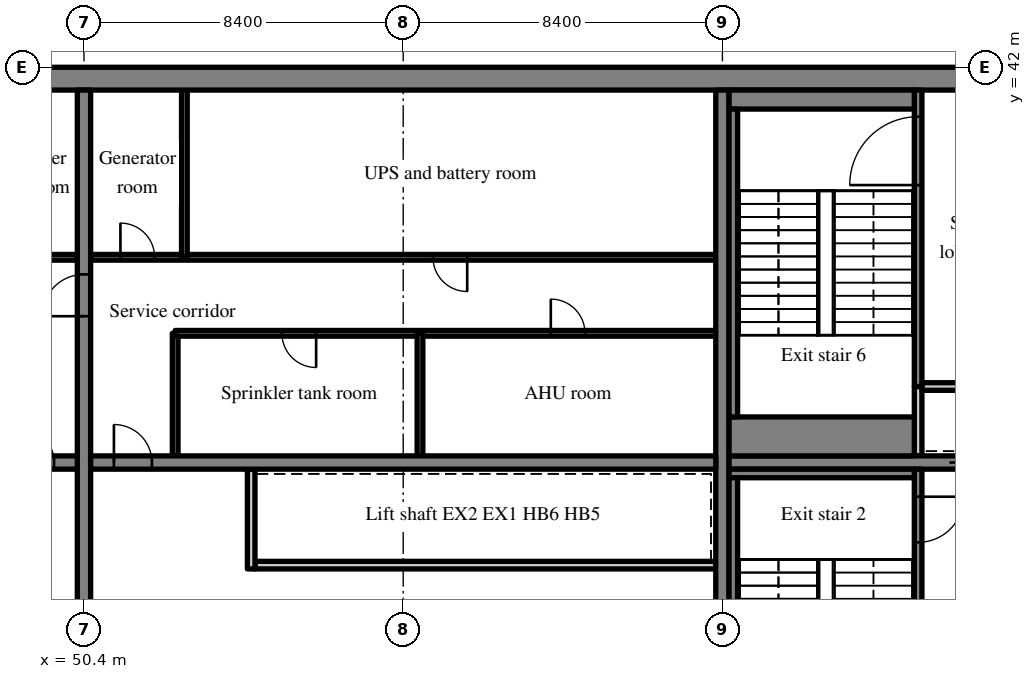
"""IFC4 building model, lengths in metres.
Left out: names, types, materials, properties, quantities, classifications, styles, units other than length and angle.
Written with IfcOpenShell. Run it as: python <this file> out.ifc"""

import sys

from ifc_helpers import new_model, si_unit, direction, frame, frame_2d, origin, place, context, subcontext, project, spatial, rectangle, extrude, source, transform, mapped, element, fill, save


model = new_model("IFC4")
c1 = context("Model", 3, precision=1e-05, world=origin(), true_north=direction((0.0, 1.0)))
c2 = subcontext(c1, "Body", "Model", "MODEL_VIEW")
j1 = project(units=[si_unit("LENGTHUNIT", "METRE"), si_unit("PLANEANGLEUNIT", "RADIAN")], contexts=[c1])
p1 = place(None, origin())
s1 = spatial("IfcSite", under=j1, at=p1, CompositionType="ELEMENT")
p2 = place(p1, origin())
s2 = spatial("IfcBuilding", under=s1, at=p2, CompositionType="ELEMENT")
p3 = place(p2, frame((0.0, 0.0, 264.7)))
s3 = spatial("IfcBuildingStorey", under=s2, at=p3, CompositionType="ELEMENT", Elevation=264.7)
m1 = source(origin(), c2, "Body", "SweptSolid", [
    extrude(rectangle(XDim=50.4, YDim=0.6, at=frame_2d((25.2, 0.0))), origin(), (0.0, 0.0, 1.0), 5.12),
])
p4 = place(p3, frame((25.2, 41.7, 0.0), z_axis=(0.0, 0.0, 1.0), x_axis=(1.0, 0.0, 0.0)))
e1 = element("IfcWall", 1, at=p4, inside=s3, PredefinedType="SHEAR", context=c2, shape_type="MappedRepresentation", body=[
    mapped(m1, transform((0.0, 0.0, 0.0), scale=1.0)),
])
m2 = source(origin(), c2, "Body", "SweptSolid", [
    extrude(rectangle(XDim=18.8, YDim=0.35, at=frame_2d((9.4, 0.0))), origin(), (0.0, 0.0, 1.0), 5.12),
])
p5 = place(p3, frame((50.4, 22.6, 0.0), z_axis=(0.0, 0.0, 1.0), x_axis=(0.0, 1.0, 0.0)))
e2 = element("IfcWall", 2, at=p5, inside=s3, PredefinedType="SHEAR", context=c2, shape_type="MappedRepresentation", body=[
    mapped(m2, transform((0.0, 0.0, 0.0), scale=1.0)),
])
m3 = source(origin(), c2, "Body", "SweptSolid", [
    extrude(rectangle(XDim=1.1, YDim=2.1, at=frame_2d((0.55, 1.05))), frame((0.0, 0.185, 0.0), z_axis=(0.0, -1.0, 0.0), x_axis=(1.0, 0.0, 0.0)), (0.0, 0.0, 1.0), 0.37),
])
p6 = place(p5, frame((12.85, 0.0, 0.0)))
e3 = element("IfcOpeningElement", 3, at=p6, cuts=e2, PredefinedType="OPENING", context=c2, shape_type="MappedRepresentation", body=[
    mapped(m3, transform((0.0, 0.0, 0.0), scale=1.0)),
])
p7 = place(p3, frame((67.2, 22.6, 0.0), z_axis=(0.0, 0.0, 1.0), x_axis=(0.0, 1.0, 0.0)))
e4 = element("IfcWall", 4, at=p7, inside=s3, PredefinedType="SHEAR", context=c2, shape_type="MappedRepresentation", body=[
    mapped(m2, transform((0.0, 0.0, 0.0), scale=1.0)),
])
m4 = source(origin(), c2, "Body", "SweptSolid", [
    extrude(rectangle(XDim=16.45, YDim=0.35, at=frame_2d((8.225, 0.0))), origin(), (0.0, 0.0, 1.0), 5.12),
])
p8 = place(p3, frame((33.775, 31.6, 0.0), z_axis=(0.0, 0.0, 1.0), x_axis=(1.0, 0.0, 0.0)))
e5 = element("IfcWall", 5, at=p8, inside=s3, PredefinedType="SHEAR", context=c2, shape_type="MappedRepresentation", body=[
    mapped(m4, transform((0.0, 0.0, 0.0), scale=1.0)),
])
m5 = source(origin(), c2, "Body", "SweptSolid", [
    extrude(rectangle(XDim=1.0, YDim=2.1, at=frame_2d((0.5, 1.05))), frame((0.0, 0.185, 0.0), z_axis=(0.0, -1.0, 0.0), x_axis=(1.0, 0.0, 0.0)), (0.0, 0.0, 1.0), 0.37),
])
p9 = place(p8, frame((14.837, 0.0, 0.0)))
e6 = element("IfcOpeningElement", 6, at=p9, cuts=e5, PredefinedType="OPENING", context=c2, shape_type="MappedRepresentation", body=[
    mapped(m5, transform((0.0, 0.0, 0.0), scale=1.0)),
])
m6 = source(origin(), c2, "Body", "SweptSolid", [
    extrude(rectangle(XDim=16.45, YDim=0.35, at=frame_2d((8.225, 0.0))), origin(), (0.0, 0.0, 1.0), 5.12),
])
p10 = place(p3, frame((50.575, 31.6, 0.0), z_axis=(0.0, 0.0, 1.0), x_axis=(1.0, 0.0, 0.0)))
e7 = element("IfcWall", 7, at=p10, inside=s3, PredefinedType="SHEAR", context=c2, shape_type="MappedRepresentation", body=[
    mapped(m6, transform((0.0, 0.0, 0.0), scale=1.0)),
])
p11 = place(p10, frame((0.613, 0.0, 0.0)))
e8 = element("IfcOpeningElement", 8, at=p11, cuts=e7, PredefinedType="OPENING", context=c2, shape_type="MappedRepresentation", body=[
    mapped(m5, transform((0.0, 0.0, 0.0), scale=1.0)),
])
m7 = source(origin(), c2, "Body", "SweptSolid", [
    extrude(rectangle(XDim=7.625, YDim=0.35, at=frame_2d((3.812, 0.0))), origin(), (0.0, 0.0, 1.0), 5.12),
])
p12 = place(p3, frame((67.375, 31.6, 0.0), z_axis=(0.0, 0.0, 1.0), x_axis=(1.0, 0.0, 0.0)))
e9 = element("IfcWall", 9, at=p12, inside=s3, PredefinedType="SHEAR", context=c2, shape_type="MappedRepresentation", body=[
    mapped(m7, transform((0.0, 0.0, 0.0), scale=1.0)),
])
p13 = place(p12, frame((5.8, 0.0, 0.0)))
e10 = element("IfcOpeningElement", 10, at=p13, cuts=e9, PredefinedType="OPENING", context=c2, shape_type="MappedRepresentation", body=[
    mapped(m3, transform((0.0, 0.0, 0.0), scale=1.0)),
])
m8 = source(origin(), c2, "Body", "SweptSolid", [
    extrude(rectangle(XDim=16.45, YDim=0.15, at=frame_2d((8.225, 0.0))), origin(), (0.0, 0.0, 1.0), 5.12),
])
p14 = place(p3, frame((33.775, 37.0, 0.0), z_axis=(0.0, 0.0, 1.0), x_axis=(1.0, 0.0, 0.0)))
e11 = element("IfcWall", 11, at=p14, inside=s3, PredefinedType="PARTITIONING", context=c2, shape_type="MappedRepresentation", body=[
    mapped(m8, transform((0.0, 0.0, 0.0), scale=1.0)),
])
m9 = source(origin(), c2, "Body", "SweptSolid", [
    extrude(rectangle(XDim=0.9, YDim=2.1, at=frame_2d((0.45, 1.05))), frame((0.0, 0.085, 0.0), z_axis=(0.0, -1.0, 0.0), x_axis=(1.0, 0.0, 0.0)), (0.0, 0.0, 1.0), 0.17),
])
p15 = place(p14, frame((0.784, 0.0, 0.0)))
e12 = element("IfcOpeningElement", 12, at=p15, cuts=e11, PredefinedType="OPENING", context=c2, shape_type="MappedRepresentation", body=[
    mapped(m9, transform((0.0, 0.0, 0.0), scale=1.0)),
])
p16 = place(p14, frame((3.663, 0.0, 0.0)))
e13 = element("IfcOpeningElement", 13, at=p16, cuts=e11, PredefinedType="OPENING", context=c2, shape_type="MappedRepresentation", body=[
    mapped(m9, transform((0.0, 0.0, 0.0), scale=1.0)),
])
p17 = place(p14, frame((9.42, 0.0, 0.0)))
e14 = element("IfcOpeningElement", 14, at=p17, cuts=e11, PredefinedType="OPENING", context=c2, shape_type="MappedRepresentation", body=[
    mapped(m9, transform((0.0, 0.0, 0.0), scale=1.0)),
])
p18 = place(p14, frame((14.766, 0.0, 0.0)))
e15 = element("IfcOpeningElement", 15, at=p18, cuts=e11, PredefinedType="OPENING", context=c2, shape_type="MappedRepresentation", body=[
    mapped(m9, transform((0.0, 0.0, 0.0), scale=1.0)),
])
m10 = source(origin(), c2, "Body", "SweptSolid", [
    extrude(rectangle(XDim=12.125, YDim=0.2, at=frame_2d((6.062, 0.0))), origin(), (0.0, 0.0, 1.0), 5.12),
])
p19 = place(p3, frame((67.025, 28.9, 0.0), z_axis=(0.0, 0.0, 1.0), x_axis=(-1.0, 0.0, 0.0)))
e16 = element("IfcWall", 16, at=p19, inside=s3, PredefinedType="SOLIDWALL", context=c2, shape_type="MappedRepresentation", body=[
    mapped(m10, transform((0.0, 0.0, 0.0), scale=1.0)),
])
m11 = source(origin(), c2, "Body", "SweptSolid", [
    extrude(rectangle(XDim=2.625, YDim=0.2, at=frame_2d((1.312, 0.0))), origin(), (0.0, 0.0, 1.0), 5.12),
])
p20 = place(p3, frame((54.8, 28.8, 0.0), z_axis=(0.0, 0.0, 1.0), x_axis=(0.0, 1.0, 0.0)))
e17 = element("IfcWall", 17, at=p20, inside=s3, PredefinedType="SOLIDWALL", context=c2, shape_type="MappedRepresentation", body=[
    mapped(m11, transform((0.0, 0.0, 0.0), scale=1.0)),
])
m12 = source(origin(), c2, "Body", "SweptSolid", [
    extrude(rectangle(XDim=3.225, YDim=0.15, at=frame_2d((1.613, 0.0))), origin(), (0.0, 0.0, 1.0), 5.12),
])
p21 = place(p3, frame((52.8, 31.775, 0.0), z_axis=(0.0, 0.0, 1.0), x_axis=(0.0, 1.0, 0.0)))
e18 = element("IfcWall", 18, at=p21, inside=s3, PredefinedType="PARTITIONING", context=c2, shape_type="MappedRepresentation", body=[
    mapped(m12, transform((0.0, 0.0, 0.0), scale=1.0)),
])
m13 = source(origin(), c2, "Body", "SweptSolid", [
    extrude(rectangle(XDim=14.225, YDim=0.15, at=frame_2d((7.112, 0.0))), origin(), (0.0, 0.0, 1.0), 5.12),
])
p22 = place(p3, frame((67.025, 35.0, 0.0), z_axis=(0.0, 0.0, 1.0), x_axis=(-1.0, 0.0, 0.0)))
e19 = element("IfcWall", 19, at=p22, inside=s3, PredefinedType="PARTITIONING", context=c2, shape_type="MappedRepresentation", body=[
    mapped(m13, transform((0.0, 0.0, 0.0), scale=1.0)),
])
p23 = place(p22, frame((3.441, 0.0, 0.0)))
e20 = element("IfcOpeningElement", 20, at=p23, cuts=e19, PredefinedType="OPENING", context=c2, shape_type="MappedRepresentation", body=[
    mapped(m9, transform((0.0, 0.0, 0.0), scale=1.0)),
])
p24 = place(p22, frame((10.516, 0.0, 0.0)))
e21 = element("IfcOpeningElement", 21, at=p24, cuts=e19, PredefinedType="OPENING", context=c2, shape_type="MappedRepresentation", body=[
    mapped(m9, transform((0.0, 0.0, 0.0), scale=1.0)),
])
m14 = source(origin(), c2, "Body", "SweptSolid", [
    extrude(rectangle(XDim=16.45, YDim=0.15, at=frame_2d((8.225, 0.0))), origin(), (0.0, 0.0, 1.0), 5.12),
])
p25 = place(p3, frame((67.025, 37.0, 0.0), z_axis=(0.0, 0.0, 1.0), x_axis=(-1.0, 0.0, 0.0)))
e22 = element("IfcWall", 22, at=p25, inside=s3, PredefinedType="PARTITIONING", context=c2, shape_type="MappedRepresentation", body=[
    mapped(m14, transform((0.0, 0.0, 0.0), scale=1.0)),
])
p26 = place(p25, frame((6.541, 0.0, 0.0)))
e23 = element("IfcOpeningElement", 23, at=p26, cuts=e22, PredefinedType="OPENING", context=c2, shape_type="MappedRepresentation", body=[
    mapped(m9, transform((0.0, 0.0, 0.0), scale=1.0)),
])
p27 = place(p25, frame((14.766, 0.0, 0.0)))
e24 = element("IfcOpeningElement", 24, at=p27, cuts=e22, PredefinedType="OPENING", context=c2, shape_type="MappedRepresentation", body=[
    mapped(m9, transform((0.0, 0.0, 0.0), scale=1.0)),
])
p28 = place(p3, frame((59.242, 31.775, 0.0), z_axis=(0.0, 0.0, 1.0), x_axis=(0.0, 1.0, 0.0)))
e25 = element("IfcWall", 25, at=p28, inside=s3, PredefinedType="PARTITIONING", context=c2, shape_type="MappedRepresentation", body=[
    mapped(m12, transform((0.0, 0.0, 0.0), scale=1.0)),
])
m15 = source(origin(), c2, "Body", "SweptSolid", [
    extrude(rectangle(XDim=4.4, YDim=0.15, at=frame_2d((2.2, 0.0))), origin(), (0.0, 0.0, 1.0), 5.12),
])
p29 = place(p3, frame((53.042, 37.0, 0.0), z_axis=(0.0, 0.0, 1.0), x_axis=(0.0, 1.0, 0.0)))
e26 = element("IfcWall", 26, at=p29, inside=s3, PredefinedType="PARTITIONING", context=c2, shape_type="MappedRepresentation", body=[
    mapped(m15, transform((0.0, 0.0, 0.0), scale=1.0)),
])
m16 = source(origin(), c2, "Body", "SweptSolid", [
    extrude(rectangle(XDim=8.825, YDim=0.2, at=frame_2d((4.413, 0.0))), origin(), (0.0, 0.0, 1.0), 5.12),
])
p30 = place(p3, frame((72.35, 22.6, 0.0), z_axis=(0.0, 0.0, 1.0), x_axis=(0.0, 1.0, 0.0)))
e27 = element("IfcWall", 27, at=p30, inside=s3, PredefinedType="SOLIDWALL", context=c2, shape_type="MappedRepresentation", body=[
    mapped(m16, transform((0.0, 0.0, 0.0), scale=1.0)),
])
m17 = source(origin(), c2, "Body", "SweptSolid", [
    extrude(rectangle(XDim=1.2, YDim=2.1, at=frame_2d((0.6, 1.05))), frame((0.0, 0.11, 0.0), z_axis=(0.0, -1.0, 0.0), x_axis=(1.0, 0.0, 0.0)), (0.0, 0.0, 1.0), 0.22),
])
p31 = place(p30, frame((6.9, 0.0, 0.0)))
e28 = element("IfcOpeningElement", 28, at=p31, cuts=e27, PredefinedType="OPENING", context=c2, shape_type="MappedRepresentation", body=[
    mapped(m17, transform((0.0, 0.0, 0.0), scale=1.0)),
])
m18 = source(origin(), c2, "Body", "SweptSolid", [
    extrude(rectangle(XDim=1.825, YDim=0.2, at=frame_2d((0.913, 0.0))), origin(), (0.0, 0.0, 1.0), 5.12),
])
p32 = place(p3, frame((72.35, 31.775, 0.0), z_axis=(0.0, 0.0, 1.0), x_axis=(0.0, 1.0, 0.0)))
e29 = element("IfcWall", 29, at=p32, inside=s3, PredefinedType="SOLIDWALL", context=c2, shape_type="MappedRepresentation", body=[
    mapped(m18, transform((0.0, 0.0, 0.0), scale=1.0)),
])
m19 = source(origin(), c2, "Body", "SweptSolid", [
    extrude(rectangle(XDim=2.55, YDim=0.2, at=frame_2d((1.275, 0.0))), origin(), (0.0, 0.0, 1.0), 5.12),
])
p33 = place(p3, frame((72.45, 33.6, 0.0), z_axis=(0.0, 0.0, 1.0), x_axis=(1.0, 0.0, 0.0)))
e30 = element("IfcWall", 30, at=p33, inside=s3, PredefinedType="SOLIDWALL", context=c2, shape_type="MappedRepresentation", body=[
    mapped(m19, transform((0.0, 0.0, 0.0), scale=1.0)),
])
m20 = source(origin(), c2, "Body", "SweptSolid", [
    extrude(rectangle(XDim=7.8, YDim=0.2, at=frame_2d((3.9, 0.0))), origin(), (0.0, 0.0, 1.0), 5.12),
])
p34 = place(p3, frame((72.35, 33.6, 0.0), z_axis=(0.0, 0.0, 1.0), x_axis=(0.0, 1.0, 0.0)))
e31 = element("IfcWall", 31, at=p34, inside=s3, PredefinedType="SOLIDWALL", context=c2, shape_type="MappedRepresentation", body=[
    mapped(m20, transform((0.0, 0.0, 0.0), scale=1.0)),
])
m21 = source(origin(), c2, "Body", "SweptSolid", [
    extrude(rectangle(XDim=1.8, YDim=2.1, at=frame_2d((0.9, 1.05))), frame((0.0, 0.11, 0.0), z_axis=(0.0, -1.0, 0.0), x_axis=(1.0, 0.0, 0.0)), (0.0, 0.0, 1.0), 0.22),
])
p35 = place(p34, frame((5.3, 0.0, 0.0)))
e32 = element("IfcOpeningElement", 32, at=p35, cuts=e31, PredefinedType="OPENING", context=c2, shape_type="MappedRepresentation", body=[
    mapped(m21, transform((0.0, 0.0, 0.0), scale=1.0)),
])
m22 = source(origin(), c2, "Body", "SweptSolid", [
    extrude(rectangle(XDim=4.875, YDim=0.225, at=frame_2d((2.438, 0.0))), origin(), (0.0, 0.0, 1.0), 5.12),
])
p36 = place(p3, frame((67.375, 31.312, 0.0), z_axis=(0.0, 0.0, 1.0), x_axis=(1.0, 0.0, 0.0)))
e33 = element("IfcWall", 33, at=p36, inside=s3, PredefinedType="SOLIDWALL", context=c2, shape_type="MappedRepresentation", body=[
    mapped(m22, transform((0.0, 0.0, 0.0), scale=1.0)),
])
m23 = source(origin(), c2, "Body", "SweptSolid", [
    extrude(rectangle(XDim=8.1, YDim=0.225, at=frame_2d((4.05, 0.0))), origin(), (0.0, 0.0, 1.0), 5.12),
])
p37 = place(p3, frame((67.487, 23.1, 0.0), z_axis=(0.0, 0.0, 1.0), x_axis=(0.0, 1.0, 0.0)))
e34 = element("IfcWall", 34, at=p37, inside=s3, PredefinedType="SOLIDWALL", context=c2, shape_type="MappedRepresentation", body=[
    mapped(m23, transform((0.0, 0.0, 0.0), scale=1.0)),
])
m24 = source(origin(), c2, "Body", "SweptSolid", [
    extrude(rectangle(XDim=4.875, YDim=0.5, at=frame_2d((2.438, 0.0))), origin(), (0.0, 0.0, 1.0), 5.12),
])
p38 = place(p3, frame((67.375, 41.15, 0.0), z_axis=(0.0, 0.0, 1.0), x_axis=(1.0, 0.0, 0.0)))
e35 = element("IfcWall", 35, at=p38, inside=s3, PredefinedType="SOLIDWALL", context=c2, shape_type="MappedRepresentation", body=[
    mapped(m24, transform((0.0, 0.0, 0.0), scale=1.0)),
])
m25 = source(origin(), c2, "Body", "SweptSolid", [
    extrude(rectangle(XDim=4.875, YDim=1.025, at=frame_2d((2.438, 0.0))), origin(), (0.0, 0.0, 1.0), 5.12),
])
p39 = place(p3, frame((67.375, 32.287, 0.0), z_axis=(0.0, 0.0, 1.0), x_axis=(1.0, 0.0, 0.0)))
e36 = element("IfcWall", 36, at=p39, inside=s3, PredefinedType="SOLIDWALL", context=c2, shape_type="MappedRepresentation", body=[
    mapped(m25, transform((0.0, 0.0, 0.0), scale=1.0)),
])
p40 = place(p3, frame((67.487, 32.8, 0.0), z_axis=(0.0, 0.0, 1.0), x_axis=(0.0, 1.0, 0.0)))
e37 = element("IfcWall", 37, at=p40, inside=s3, PredefinedType="SOLIDWALL", context=c2, shape_type="MappedRepresentation", body=[
    mapped(m23, transform((0.0, 0.0, 0.0), scale=1.0)),
])
m26 = source(origin(), c2, "Body", "SweptSolid", [
    extrude(rectangle(XDim=1.0, YDim=2.1, at=frame_2d((0.5, 1.05))), frame((0.0, 0.025, 0.0), z_axis=(0.0, -1.0, 0.0), x_axis=(1.0, 0.0, 0.0)), (0.0, 0.0, 1.0), 0.05),
])
p41 = place(p9, origin())
e38 = element("IfcDoor", 38, at=p41, inside=s3, OperationType="SINGLE_SWING_LEFT", PredefinedType="DOOR", context=c2, shape_type="MappedRepresentation", body=[
    mapped(m26, transform((0.0, 0.0, 0.0), scale=1.0)),
])
fill(e6, e38)
p42 = place(p11, origin())
e39 = element("IfcDoor", 39, at=p42, inside=s3, OperationType="SINGLE_SWING_LEFT", PredefinedType="DOOR", context=c2, shape_type="MappedRepresentation", body=[
    mapped(m26, transform((0.0, 0.0, 0.0), scale=1.0)),
])
fill(e8, e39)
m27 = source(origin(), c2, "Body", "SweptSolid", [
    extrude(rectangle(XDim=0.9, YDim=2.1, at=frame_2d((0.45, 1.05))), frame((0.0, 0.025, 0.0), z_axis=(0.0, -1.0, 0.0), x_axis=(1.0, 0.0, 0.0)), (0.0, 0.0, 1.0), 0.05),
])
p43 = place(p23, origin())
e40 = element("IfcDoor", 40, at=p43, inside=s3, OperationType="SINGLE_SWING_RIGHT", PredefinedType="DOOR", context=c2, shape_type="MappedRepresentation", body=[
    mapped(m27, transform((0.0, 0.0, 0.0), scale=1.0)),
])
fill(e20, e40)
p44 = place(p24, origin())
e41 = element("IfcDoor", 41, at=p44, inside=s3, OperationType="SINGLE_SWING_LEFT", PredefinedType="DOOR", context=c2, shape_type="MappedRepresentation", body=[
    mapped(m27, transform((0.0, 0.0, 0.0), scale=1.0)),
])
fill(e21, e41)
p45 = place(p26, origin())
e42 = element("IfcDoor", 42, at=p45, inside=s3, OperationType="SINGLE_SWING_LEFT", PredefinedType="DOOR", context=c2, shape_type="MappedRepresentation", body=[
    mapped(m27, transform((0.0, 0.0, 0.0), scale=1.0)),
])
fill(e23, e42)
p46 = place(p27, origin())
e43 = element("IfcDoor", 43, at=p46, inside=s3, OperationType="SINGLE_SWING_RIGHT", PredefinedType="DOOR", context=c2, shape_type="MappedRepresentation", body=[
    mapped(m27, transform((0.0, 0.0, 0.0), scale=1.0)),
])
fill(e24, e43)
m28 = source(origin(), c2, "Body", "SweptSolid", [
    extrude(rectangle(XDim=1.2, YDim=2.1, at=frame_2d((0.6, 1.05))), frame((0.0, 0.025, 0.0), z_axis=(0.0, -1.0, 0.0), x_axis=(1.0, 0.0, 0.0)), (0.0, 0.0, 1.0), 0.05),
])
p47 = place(p31, origin())
e44 = element("IfcDoor", 44, at=p47, inside=s3, OperationType="SINGLE_SWING_RIGHT", PredefinedType="DOOR", context=c2, shape_type="MappedRepresentation", body=[
    mapped(m28, transform((0.0, 0.0, 0.0), scale=1.0)),
])
fill(e28, e44)
m29 = source(origin(), c2, "Body", "SweptSolid", [
    extrude(rectangle(XDim=1.1, YDim=2.1, at=frame_2d((0.55, 1.05))), frame((0.0, 0.025, 0.0), z_axis=(0.0, -1.0, 0.0), x_axis=(1.0, 0.0, 0.0)), (0.0, 0.0, 1.0), 0.05),
])
p48 = place(p13, origin())
e45 = element("IfcDoor", 45, at=p48, inside=s3, OperationType="SLIDING_TO_LEFT", PredefinedType="DOOR", context=c2, shape_type="MappedRepresentation", body=[
    mapped(m29, transform((0.0, 0.0, 0.0), scale=1.0)),
])
fill(e10, e45)
m30 = source(origin(), c2, "Body", "SweptSolid", [
    extrude(rectangle(XDim=1.8, YDim=2.1, at=frame_2d((0.9, 1.05))), frame((0.0, 0.025, 0.0), z_axis=(0.0, -1.0, 0.0), x_axis=(1.0, 0.0, 0.0)), (0.0, 0.0, 1.0), 0.05),
])
p49 = place(p35, origin())
e46 = element("IfcDoor", 46, at=p49, inside=s3, OperationType="SINGLE_SWING_LEFT", PredefinedType="DOOR", context=c2, shape_type="MappedRepresentation", body=[
    mapped(m30, transform((0.0, 0.0, 0.0), scale=1.0)),
])
fill(e32, e46)
p50 = place(p6, origin())
e47 = element("IfcDoor", 47, at=p50, inside=s3, OperationType="SINGLE_SWING_LEFT", PredefinedType="DOOR", context=c2, shape_type="MappedRepresentation", body=[
    mapped(m29, transform((0.0, 0.0, 0.0), scale=1.0)),
])
fill(e3, e47)
save(model, sys.argv[1])
